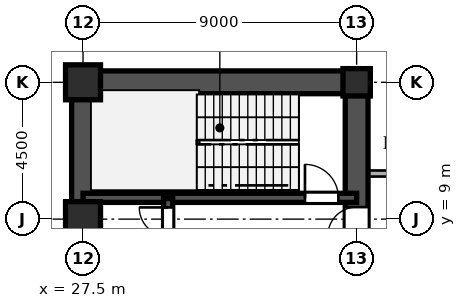
"""IFC4 building model, lengths in metres.
Left out: names, types, materials, properties, quantities, classifications, styles, units other than length and angle.
Written with IfcOpenShell. Run it as: python <this file> out.ifc"""

import sys

from ifc_helpers import new_model, si_unit, direction, frame, frame_2d, origin, origin_2d, place, context, subcontext, project, spatial, rectangle, hollow_rectangle, i_section, extrude, source, transform, mapped, element, fill, save


model = new_model("IFC4")
c1 = context("Model", 3, precision=1e-05, world=origin(), true_north=direction((0.0, 1.0)))
c2 = subcontext(c1, "Body", "Model", "MODEL_VIEW")
j1 = project(units=[si_unit("LENGTHUNIT", "METRE"), si_unit("PLANEANGLEUNIT", "RADIAN")], contexts=[c1])
p1 = place(None, origin())
s1 = spatial("IfcSite", under=j1, at=p1, CompositionType="ELEMENT")
p2 = place(p1, origin())
s2 = spatial("IfcBuilding", under=s1, at=p2, CompositionType="ELEMENT")
p3 = place(p2, frame((0.0, 0.0, 5.4)))
s3 = spatial("IfcBuildingStorey", under=s2, at=p3, CompositionType="ELEMENT", Elevation=5.4)
m1 = source(origin(), c2, "Body", "SweptSolid", [
    extrude(hollow_rectangle(XDim=1.15, YDim=1.15, WallThickness=0.048, at=origin_2d()), origin(), (0.0, 0.0, 1.0), 4.5),
])
for number, where, z_axis, x_axis in (
    (1, (27.5, 9.0, 0.0), (0.0, 0.0, 1.0), (1.0, 0.0, 0.0)),
    (2, (27.5, 13.5, 0.0), (0.0, 0.0, 1.0), (1.0, 0.0, 0.0)),
):
    element("IfcColumn", number, at=place(p3, frame(where, z_axis=z_axis, x_axis=x_axis)), inside=s3, PredefinedType="COLUMN", context=c2, shape_type="MappedRepresentation", body=[
        mapped(m1, transform((0.0, 0.0, 0.0), scale=1.0)),
    ])
m2 = source(origin(), c2, "Body", "SweptSolid", [
    extrude(i_section(OverallWidth=0.9, OverallDepth=0.9, WebThickness=0.036, FlangeThickness=0.055, at=origin_2d()), origin(), (0.0, 0.0, 1.0), 4.5),
])
p4 = place(p3, frame((36.5, 13.5, 0.0), z_axis=(0.0, 0.0, 1.0), x_axis=(1.0, 0.0, 0.0)))
e3 = element("IfcColumn", 3, at=p4, inside=s3, PredefinedType="COLUMN", context=c2, shape_type="MappedRepresentation", body=[
    mapped(m2, transform((0.0, 0.0, 0.0), scale=1.0)),
])
p5 = place(p3, frame((27.5, 1.3, 0.0), z_axis=(0.0, 0.0, 1.0), x_axis=(0.0, 1.0, 0.0)))
e4 = element("IfcWall", 4, at=p5, inside=s3, PredefinedType="SHEAR", context=c2, shape_type="SweptSolid", body=[
    extrude(rectangle(XDim=12.2, YDim=0.75, at=frame_2d((6.1, 0.0))), origin(), (0.0, 0.0, 1.0), 4.22),
])
p6 = place(p3, frame((27.5, 13.5, 0.0), z_axis=(0.0, 0.0, 1.0), x_axis=(1.0, 0.0, 0.0)))
e5 = element("IfcWall", 5, at=p6, inside=s3, PredefinedType="SHEAR", context=c2, shape_type="SweptSolid", body=[
    extrude(rectangle(XDim=9.0, YDim=0.75, at=frame_2d((4.5, 0.0))), origin(), (0.0, 0.0, 1.0), 4.22),
])
p7 = place(p3, frame((36.5, 8.2, 0.0), z_axis=(0.0, 0.0, 1.0), x_axis=(0.0, 1.0, 0.0)))
e6 = element("IfcWall", 6, at=p7, inside=s3, PredefinedType="SHEAR", context=c2, shape_type="SweptSolid", body=[
    extrude(rectangle(XDim=5.45, YDim=0.75, at=frame_2d((2.725, 0.0))), origin(), (0.0, 0.0, 1.0), 4.22),
])
p8 = place(p7, frame((0.245, 0.0, 0.0)))
e7 = element("IfcOpeningElement", 7, at=p8, cuts=e6, PredefinedType="OPENING", context=c2, shape_type="SweptSolid", body=[
    extrude(rectangle(XDim=0.95, YDim=2.15, at=frame_2d((0.475, 1.075))), frame((0.0, 0.385, 0.0), z_axis=(0.0, -1.0, 0.0), x_axis=(1.0, 0.0, 0.0)), (0.0, 0.0, 1.0), 0.77),
])
p9 = place(p3, frame((27.5, 9.7, 0.0), z_axis=(0.0, 0.0, 1.0), x_axis=(1.0, 0.0, 0.0)))
e8 = element("IfcWall", 8, at=p9, inside=s3, PredefinedType="SHEAR", context=c2, shape_type="SweptSolid", body=[
    extrude(rectangle(XDim=9.0, YDim=0.3, at=frame_2d((4.5, 0.0))), origin(), (0.0, 0.0, 1.0), 4.22),
])
p10 = place(p9, frame((7.3, 0.0, 0.0)))
e9 = element("IfcOpeningElement", 9, at=p10, cuts=e8, PredefinedType="OPENING", context=c2, shape_type="SweptSolid", body=[
    extrude(rectangle(XDim=1.1, YDim=2.2, at=frame_2d((0.55, 1.1))), frame((0.0, 0.16, 0.0), z_axis=(0.0, -1.0, 0.0), x_axis=(1.0, 0.0, 0.0)), (0.0, 0.0, 1.0), 0.32),
])
p11 = place(p3, frame((30.3, 8.15, 0.0), z_axis=(0.0, 0.0, 1.0), x_axis=(0.0, 1.0, 0.0)))
e10 = element("IfcWall", 10, at=p11, inside=s3, PredefinedType="SHEAR", context=c2, shape_type="SweptSolid", body=[
    extrude(rectangle(XDim=1.53, YDim=0.3, at=frame_2d((0.765, 0.0))), origin(), (0.0, 0.0, 1.0), 4.22),
])
p12 = place(p11, frame((0.285, 0.0, 0.0)))
e11 = element("IfcOpeningElement", 11, at=p12, cuts=e10, PredefinedType="OPENING", context=c2, shape_type="SweptSolid", body=[
    extrude(rectangle(XDim=0.95, YDim=2.15, at=frame_2d((0.475, 1.075))), frame((0.0, 0.16, 0.0), z_axis=(0.0, -1.0, 0.0), x_axis=(1.0, 0.0, 0.0)), (0.0, 0.0, 1.0), 0.32),
])
p13 = place(p3, frame((36.88, 10.5, 0.0), z_axis=(0.0, 0.0, 1.0), x_axis=(1.0, 0.0, 0.0)))
e12 = element("IfcWall", 12, at=p13, inside=s3, PredefinedType="PARTITIONING", context=c2, shape_type="SweptSolid", body=[
    extrude(rectangle(XDim=2.035, YDim=0.2, at=frame_2d((1.018, 0.0))), origin(), (0.0, 0.0, 1.0), 4.22),
])
m3 = source(origin(), c2, "Body", "SweptSolid", [
    extrude(rectangle(XDim=0.95, YDim=2.15, at=frame_2d((0.475, 1.075))), frame((0.0, 0.025, 0.0), z_axis=(0.0, -1.0, 0.0), x_axis=(1.0, 0.0, 0.0)), (0.0, 0.0, 1.0), 0.05),
])
p14 = place(p8, origin())
e13 = element("IfcDoor", 13, at=p14, inside=s3, OperationType="SINGLE_SWING_LEFT", PredefinedType="DOOR", context=c2, shape_type="MappedRepresentation", body=[
    mapped(m3, transform((0.0, 0.0, 0.0), scale=1.0)),
])
fill(e7, e13)
m4 = source(origin(), c2, "Body", "SweptSolid", [
    extrude(rectangle(XDim=1.1, YDim=2.2, at=frame_2d((0.55, 1.1))), frame((0.0, 0.025, 0.0), z_axis=(0.0, -1.0, 0.0), x_axis=(1.0, 0.0, 0.0)), (0.0, 0.0, 1.0), 0.05),
])
p15 = place(p10, origin())
e14 = element("IfcDoor", 14, at=p15, inside=s3, OperationType="SINGLE_SWING_LEFT", PredefinedType="DOOR", context=c2, shape_type="MappedRepresentation", body=[
    mapped(m4, transform((0.0, 0.0, 0.0), scale=1.0)),
])
fill(e9, e14)
p16 = place(p12, origin())
e15 = element("IfcDoor", 15, at=p16, inside=s3, OperationType="SINGLE_SWING_RIGHT", PredefinedType="DOOR", context=c2, shape_type="MappedRepresentation", body=[
    mapped(m3, transform((0.0, 0.0, 0.0), scale=1.0)),
])
fill(e11, e15)
save(model, sys.argv[1])
